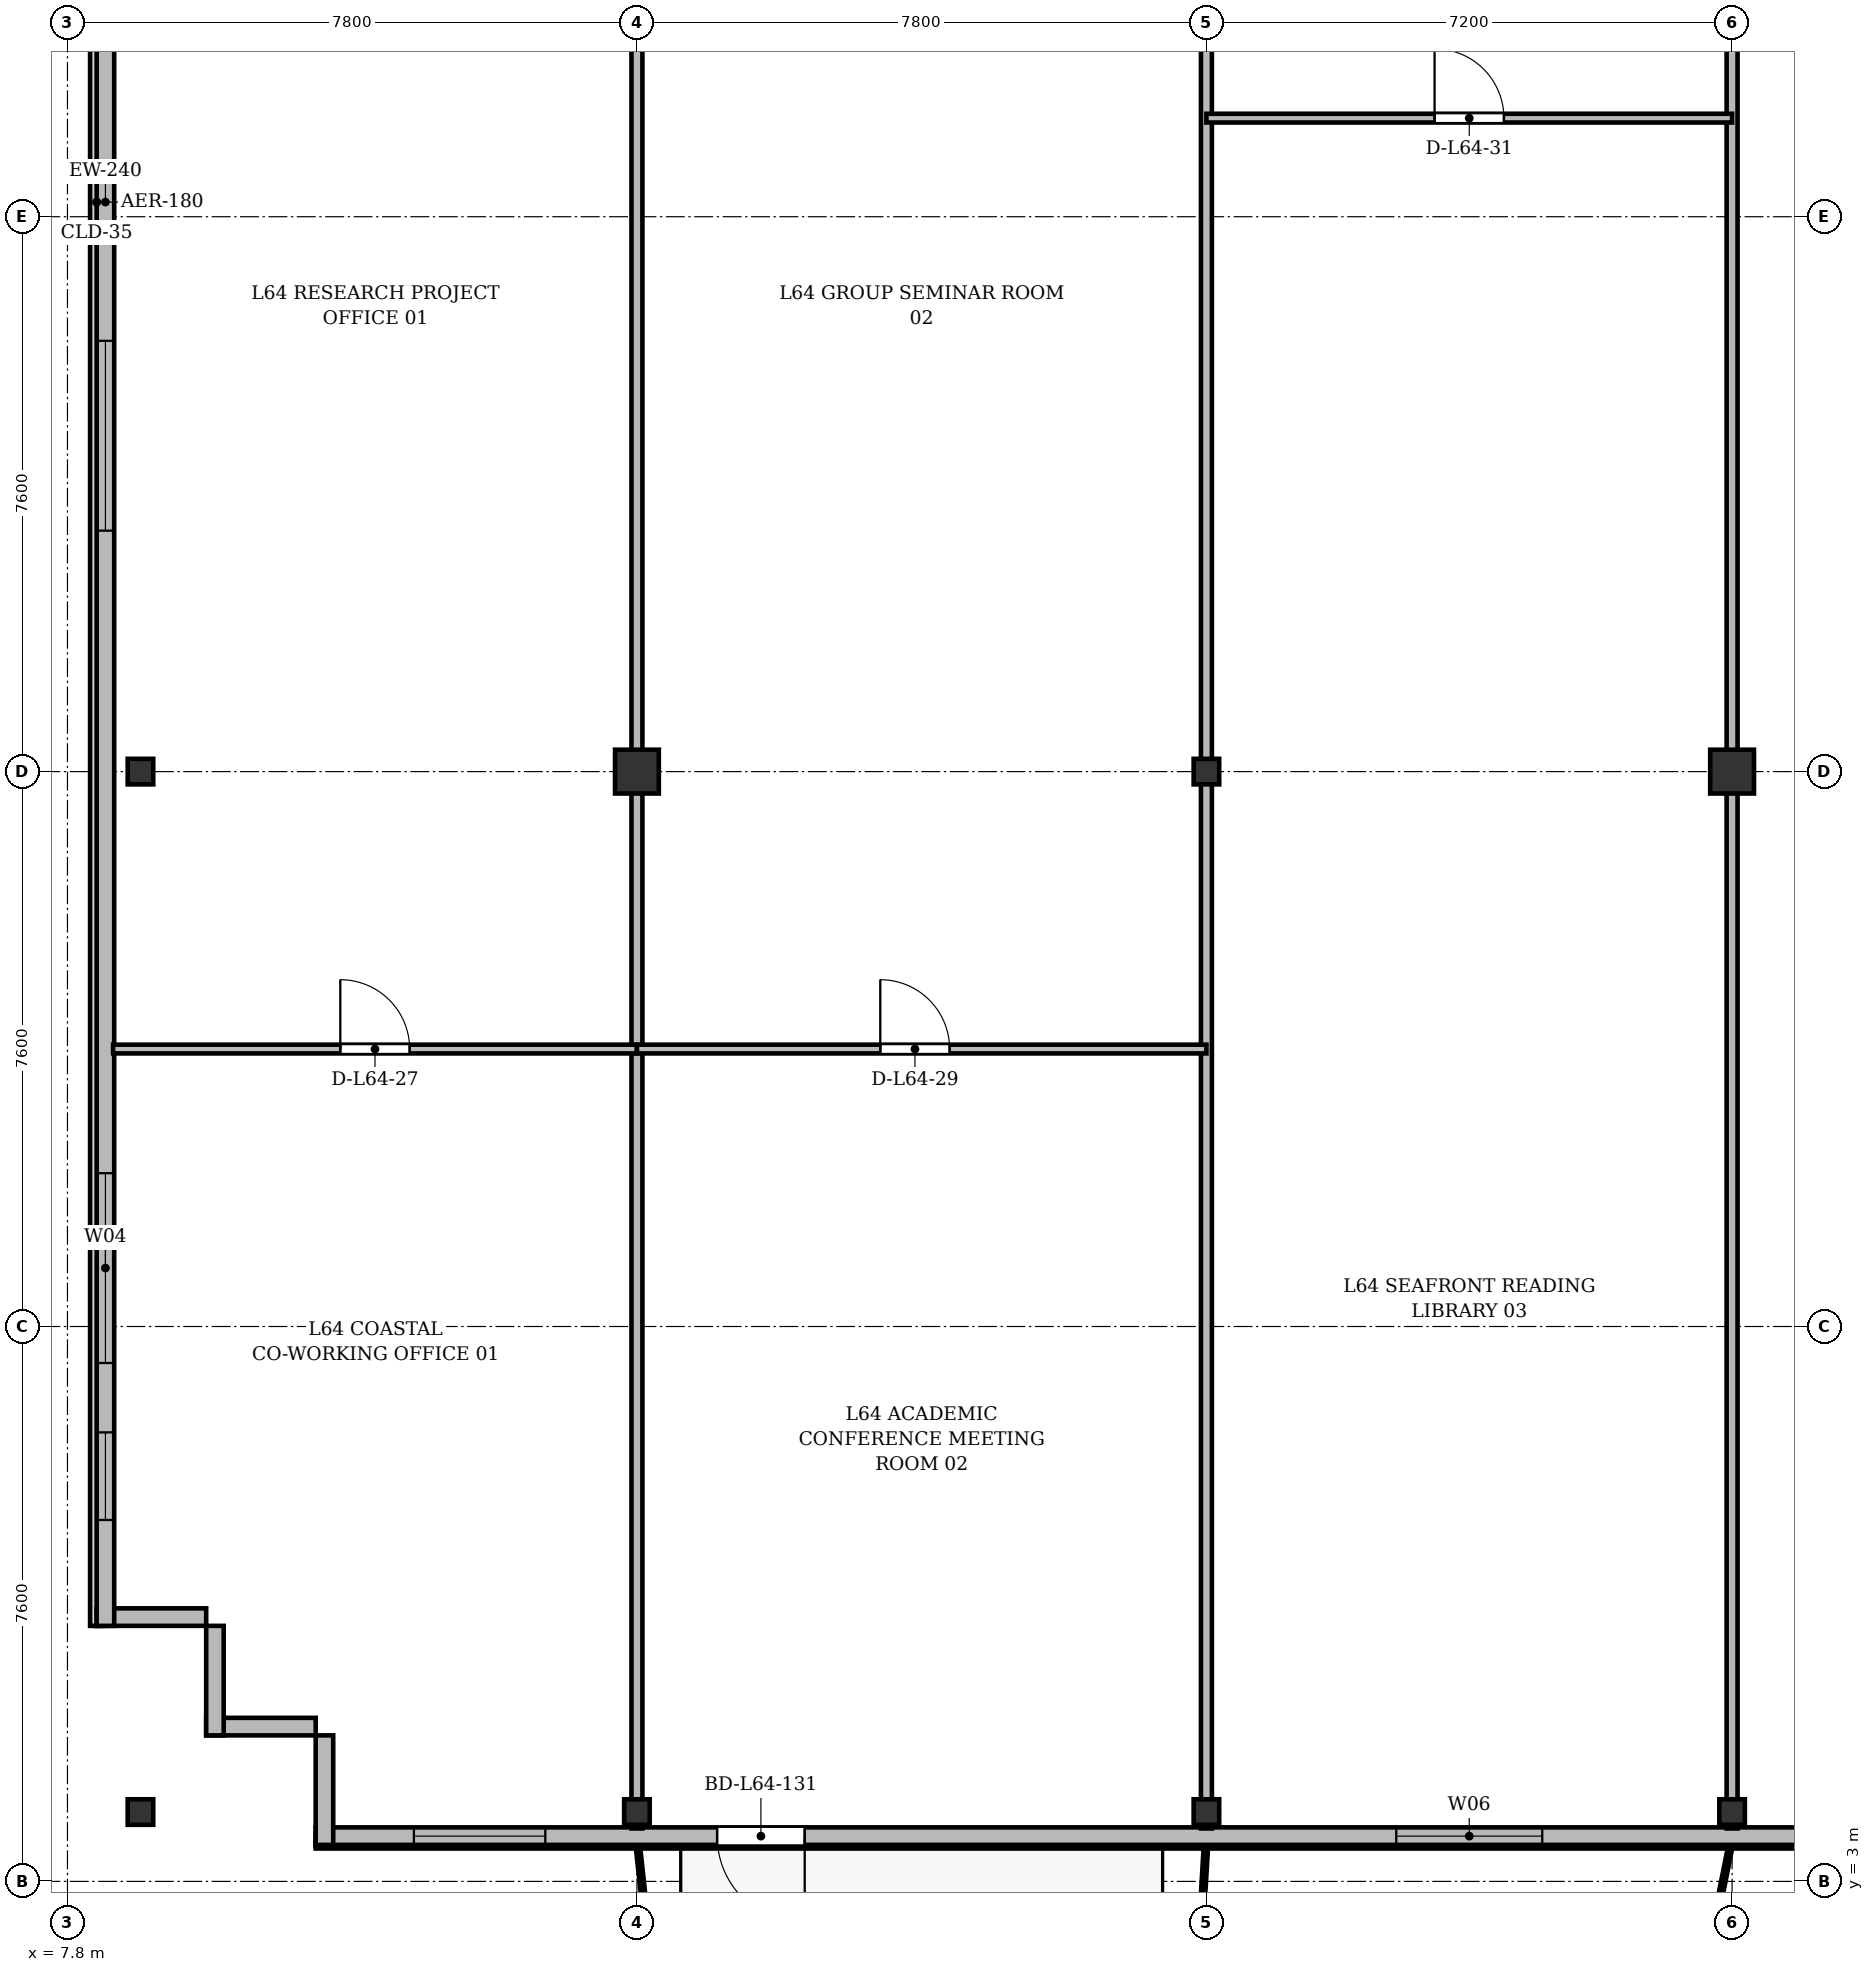
"""IFC4 building model, lengths in metres.
Left out: names, types, materials, properties, quantities, classifications, styles, units other than length and angle.
Written with IfcOpenShell. Run it as: python <this file> out.ifc"""

import sys

from ifc_helpers import new_model, si_unit, direction, frame, frame_2d, origin, origin_2d, place, context, subcontext, project, spatial, rectangle, i_section, extrude, source, transform, mapped, element, fill, save


model = new_model("IFC4")
c1 = context("Model", 3, precision=1e-05, world=origin(), true_north=direction((0.0, 1.0)))
c2 = subcontext(c1, "Body", "Model", "MODEL_VIEW")
j1 = project(units=[si_unit("LENGTHUNIT", "METRE"), si_unit("PLANEANGLEUNIT", "RADIAN")], contexts=[c1])
p1 = place(None, origin())
s1 = spatial("IfcSite", under=j1, at=p1, CompositionType="ELEMENT")
p2 = place(p1, origin())
s2 = spatial("IfcBuilding", under=s1, at=p2, CompositionType="ELEMENT")
p3 = place(p2, frame((0.0, 0.0, 248.7)))
s3 = spatial("IfcBuildingStorey", under=s2, at=p3, CompositionType="ELEMENT", Elevation=248.7)
m1 = source(origin(), c2, "Body", "SweptSolid", [
    extrude(i_section(OverallWidth=0.35, OverallDepth=0.35, WebThickness=0.018, FlangeThickness=0.028, at=origin_2d()), origin(), (0.0, 0.0, 1.0), 3.6),
])
for number, where, z_axis, x_axis in (
    (1, (8.8, 3.95, 0.0), (0.0, 0.0, 1.0), (1.0, 0.0, 0.0)),
    (2, (8.8, 18.2, 0.0), (0.0, 0.0, 1.0), (1.0, 0.0, 0.0)),
    (3, (15.6, 3.95, 0.0), (0.0, 0.0, 1.0), (1.0, 0.0, 0.0)),
):
    element("IfcColumn", number, at=place(p3, frame(where, z_axis=z_axis, x_axis=x_axis)), inside=s3, PredefinedType="COLUMN", context=c2, shape_type="MappedRepresentation", body=[
        mapped(m1, transform((0.0, 0.0, 0.0), x_axis=(1.0, 0.0, 0.0), y_axis=(0.0, 1.0, 0.0), z_axis=(0.0, 0.0, 1.0), scale=1.0)),
    ])
m2 = source(origin(), c2, "Body", "SweptSolid", [
    extrude(rectangle(XDim=0.6, YDim=0.6, at=origin_2d()), origin(), (0.0, 0.0, 1.0), 3.6),
])
p4 = place(p3, frame((15.6, 18.2, 0.0), z_axis=(0.0, 0.0, 1.0), x_axis=(1.0, 0.0, 0.0)))
e4 = element("IfcColumn", 4, at=p4, inside=s3, PredefinedType="COLUMN", context=c2, shape_type="MappedRepresentation", body=[
    mapped(m2, transform((0.0, 0.0, 0.0), x_axis=(1.0, 0.0, 0.0), y_axis=(0.0, 1.0, 0.0), z_axis=(0.0, 0.0, 1.0), scale=1.0)),
])
for number, where, z_axis, x_axis in (
    (5, (23.4, 3.95, 0.0), (0.0, 0.0, 1.0), (1.0, 0.0, 0.0)),
    (6, (23.4, 18.2, 0.0), (0.0, 0.0, 1.0), (1.0, 0.0, 0.0)),
    (7, (30.6, 3.95, 0.0), (0.0, 0.0, 1.0), (1.0, 0.0, 0.0)),
):
    element("IfcColumn", number, at=place(p3, frame(where, z_axis=z_axis, x_axis=x_axis)), inside=s3, PredefinedType="COLUMN", context=c2, shape_type="MappedRepresentation", body=[
        mapped(m1, transform((0.0, 0.0, 0.0), x_axis=(1.0, 0.0, 0.0), y_axis=(0.0, 1.0, 0.0), z_axis=(0.0, 0.0, 1.0), scale=1.0)),
    ])
p5 = place(p3, frame((30.6, 18.2, 0.0), z_axis=(0.0, 0.0, 1.0), x_axis=(1.0, 0.0, 0.0)))
e8 = element("IfcColumn", 8, at=p5, inside=s3, PredefinedType="COLUMN", context=c2, shape_type="MappedRepresentation", body=[
    mapped(m2, transform((0.0, 0.0, 0.0), x_axis=(1.0, 0.0, 0.0), y_axis=(0.0, 1.0, 0.0), z_axis=(0.0, 0.0, 1.0), scale=1.0)),
])
for number, where, z_axis, x_axis in (
    (9, (11.2, 5.12, 0.0), (0.0, 0.0, 1.0), (-1.0, 0.0, 0.0)),
    (10, (9.82, 5.0, 0.0), (0.0, 0.0, 1.0), (0.0, 1.0, 0.0)),
):
    element("IfcWall", number, at=place(p3, frame(where, z_axis=z_axis, x_axis=x_axis)), inside=s3, PredefinedType="SOLIDWALL", context=c2, shape_type="SweptSolid", body=[
        extrude(rectangle(XDim=1.5, YDim=0.24, at=frame_2d((0.75, 0.0))), origin(), (0.0, 0.0, 1.0), 3.37),
    ])
p6 = place(p3, frame((9.7, 6.62, 0.0), z_axis=(0.0, 0.0, 1.0), x_axis=(-1.0, 0.0, 0.0)))
e11 = element("IfcWall", 11, at=p6, inside=s3, PredefinedType="SOLIDWALL", context=c2, shape_type="SweptSolid", body=[
    extrude(rectangle(XDim=1.5, YDim=0.24, at=frame_2d((0.75, 0.0))), origin(), (0.0, 0.0, 1.0), 2.87),
])
p7 = place(p3, frame((8.32, 6.5, 0.0), z_axis=(0.0, 0.0, 1.0), x_axis=(0.0, 1.0, 0.0)))
e12 = element("IfcWall", 12, at=p7, inside=s3, PredefinedType="SOLIDWALL", context=c2, shape_type="SweptSolid", body=[
    extrude(rectangle(XDim=39.0, YDim=0.24, at=frame_2d((19.5, 0.0))), origin(), (0.0, 0.0, 1.0), 3.37),
])
p8 = place(p7, frame((1.45, 0.0, 0.92)))
e13 = element("IfcOpeningElement", 13, at=p8, cuts=e12, PredefinedType="OPENING", context=c2, shape_type="SweptSolid", body=[
    extrude(rectangle(XDim=1.2, YDim=1.65, at=frame_2d((0.6, 0.825))), frame((0.0, 0.13, 0.0), z_axis=(0.0, -1.0, 0.0), x_axis=(1.0, 0.0, 0.0)), (0.0, 0.0, 1.0), 0.26),
])
p9 = place(p7, frame((3.6, 0.0, 0.92)))
e14 = element("IfcOpeningElement", 14, at=p9, cuts=e12, PredefinedType="OPENING", context=c2, shape_type="SweptSolid", body=[
    extrude(rectangle(XDim=2.6, YDim=1.9, at=frame_2d((1.3, 0.95))), frame((0.0, 0.13, 0.0), z_axis=(0.0, -1.0, 0.0), x_axis=(1.0, 0.0, 0.0)), (0.0, 0.0, 1.0), 0.26),
])
p10 = place(p7, frame((15.0, 0.0, 0.92)))
e15 = element("IfcOpeningElement", 15, at=p10, cuts=e12, PredefinedType="OPENING", context=c2, shape_type="SweptSolid", body=[
    extrude(rectangle(XDim=2.6, YDim=1.9, at=frame_2d((1.3, 0.95))), frame((0.0, 0.13, 0.0), z_axis=(0.0, -1.0, 0.0), x_axis=(1.0, 0.0, 0.0)), (0.0, 0.0, 1.0), 0.26),
])
p11 = place(p7, frame((29.0, 0.0, 0.92)))
e16 = element("IfcOpeningElement", 16, at=p11, cuts=e12, PredefinedType="OPENING", context=c2, shape_type="SweptSolid", body=[
    extrude(rectangle(XDim=2.6, YDim=1.9, at=frame_2d((1.3, 0.95))), frame((0.0, 0.13, 0.0), z_axis=(0.0, -1.0, 0.0), x_axis=(1.0, 0.0, 0.0)), (0.0, 0.0, 1.0), 0.26),
])
p12 = place(p7, frame((33.3, 0.0, 0.92)))
e17 = element("IfcOpeningElement", 17, at=p12, cuts=e12, PredefinedType="OPENING", context=c2, shape_type="SweptSolid", body=[
    extrude(rectangle(XDim=1.2, YDim=1.65, at=frame_2d((0.6, 0.825))), frame((0.0, 0.13, 0.0), z_axis=(0.0, -1.0, 0.0), x_axis=(1.0, 0.0, 0.0)), (0.0, 0.0, 1.0), 0.26),
])
p13 = place(p7, frame((36.65, 0.0, 0.92)))
e18 = element("IfcOpeningElement", 18, at=p13, cuts=e12, PredefinedType="OPENING", context=c2, shape_type="SweptSolid", body=[
    extrude(rectangle(XDim=1.2, YDim=1.65, at=frame_2d((0.6, 0.825))), frame((0.0, 0.13, 0.0), z_axis=(0.0, -1.0, 0.0), x_axis=(1.0, 0.0, 0.0)), (0.0, 0.0, 1.0), 0.26),
])
p14 = place(p3, frame((63.2, 3.62, 0.0), z_axis=(0.0, 0.0, 1.0), x_axis=(-1.0, 0.0, 0.0)))
e19 = element("IfcWall", 19, at=p14, inside=s3, PredefinedType="SOLIDWALL", context=c2, shape_type="SweptSolid", body=[
    extrude(rectangle(XDim=52.0, YDim=0.24, at=frame_2d((26.0, 0.0))), origin(), (0.0, 0.0, 1.0), 3.37),
])
p15 = place(p14, frame((1.42, 0.0, 0.9)))
e20 = element("IfcOpeningElement", 20, at=p15, cuts=e19, PredefinedType="OPENING", context=c2, shape_type="SweptSolid", body=[
    extrude(rectangle(XDim=1.65, YDim=1.85, at=frame_2d((0.825, 0.925))), frame((0.0, 0.13, 0.0), z_axis=(0.0, -1.0, 0.0), x_axis=(1.0, 0.0, 0.0)), (0.0, 0.0, 1.0), 0.26),
])
p16 = place(p14, frame((7.4, 0.0, 0.9)))
e21 = element("IfcOpeningElement", 21, at=p16, cuts=e19, PredefinedType="OPENING", context=c2, shape_type="SweptSolid", body=[
    extrude(rectangle(XDim=1.8, YDim=1.8, at=frame_2d((0.9, 0.9))), frame((0.0, 0.13, 0.0), z_axis=(0.0, -1.0, 0.0), x_axis=(1.0, 0.0, 0.0)), (0.0, 0.0, 1.0), 0.26),
])
p17 = place(p14, frame((14.017, 0.0, 0.0)))
e22 = element("IfcOpeningElement", 22, at=p17, cuts=e19, PredefinedType="OPENING", context=c2, shape_type="SweptSolid", body=[
    extrude(rectangle(XDim=1.2, YDim=2.2, at=frame_2d((0.6, 1.1))), frame((0.0, 0.13, 0.0), z_axis=(0.0, -1.0, 0.0), x_axis=(1.0, 0.0, 0.0)), (0.0, 0.0, 1.0), 0.26),
])
p18 = place(p14, frame((25.25, 0.0, 0.9)))
e23 = element("IfcOpeningElement", 23, at=p18, cuts=e19, PredefinedType="OPENING", context=c2, shape_type="SweptSolid", body=[
    extrude(rectangle(XDim=1.5, YDim=1.75, at=frame_2d((0.75, 0.875))), frame((0.0, 0.13, 0.0), z_axis=(0.0, -1.0, 0.0), x_axis=(1.0, 0.0, 0.0)), (0.0, 0.0, 1.0), 0.26),
])
p19 = place(p14, frame((35.2, 0.0, 0.9)))
e24 = element("IfcOpeningElement", 24, at=p19, cuts=e19, PredefinedType="OPENING", context=c2, shape_type="SweptSolid", body=[
    extrude(rectangle(XDim=2.0, YDim=1.95, at=frame_2d((1.0, 0.975))), frame((0.0, 0.13, 0.0), z_axis=(0.0, -1.0, 0.0), x_axis=(1.0, 0.0, 0.0)), (0.0, 0.0, 1.0), 0.26),
])
p20 = place(p14, frame((45.302, 0.0, 0.0)))
e25 = element("IfcOpeningElement", 25, at=p20, cuts=e19, PredefinedType="OPENING", context=c2, shape_type="SweptSolid", body=[
    extrude(rectangle(XDim=1.2, YDim=2.2, at=frame_2d((0.6, 1.1))), frame((0.0, 0.13, 0.0), z_axis=(0.0, -1.0, 0.0), x_axis=(1.0, 0.0, 0.0)), (0.0, 0.0, 1.0), 0.26),
])
p21 = place(p14, frame((48.855, 0.0, 0.9)))
e26 = element("IfcOpeningElement", 26, at=p21, cuts=e19, PredefinedType="OPENING", context=c2, shape_type="SweptSolid", body=[
    extrude(rectangle(XDim=1.8, YDim=1.8, at=frame_2d((0.9, 0.9))), frame((0.0, 0.13, 0.0), z_axis=(0.0, -1.0, 0.0), x_axis=(1.0, 0.0, 0.0)), (0.0, 0.0, 1.0), 0.26),
])
p22 = place(p3, frame((11.32, 3.5, 0.0), z_axis=(0.0, 0.0, 1.0), x_axis=(0.0, 1.0, 0.0)))
e27 = element("IfcWall", 27, at=p22, inside=s3, PredefinedType="SOLIDWALL", context=c2, shape_type="SweptSolid", body=[
    extrude(rectangle(XDim=1.5, YDim=0.24, at=frame_2d((0.75, 0.0))), origin(), (0.0, 0.0, 1.0), 2.92),
])
for number, where, z_axis, x_axis in (
    (28, (15.6, 3.725, 0.0), (0.0, 0.0, 1.0), (0.0, 1.0, 0.0)),
    (29, (23.4, 3.725, 0.0), (0.0, 0.0, 1.0), (0.0, 1.0, 0.0)),
    (30, (30.6, 3.725, 0.0), (0.0, 0.0, 1.0), (0.0, 1.0, 0.0)),
):
    element("IfcWall", number, at=place(p3, frame(where, z_axis=z_axis, x_axis=x_axis)), inside=s3, PredefinedType="PARTITIONING", context=c2, shape_type="SweptSolid", body=[
        extrude(rectangle(XDim=27.275, YDim=0.15, at=frame_2d((13.637, 0.0))), origin(), (0.0, 0.0, 1.0), 2.87),
    ])
p23 = place(p3, frame((8.425, 14.4, 0.0), z_axis=(0.0, 0.0, 1.0), x_axis=(1.0, 0.0, 0.0)))
e31 = element("IfcWall", 31, at=p23, inside=s3, PredefinedType="PARTITIONING", context=c2, shape_type="SweptSolid", body=[
    extrude(rectangle(XDim=7.175, YDim=0.12, at=frame_2d((3.587, 0.0))), origin(), (0.0, 0.0, 1.0), 2.87),
])
p24 = place(p23, frame((3.112, 0.0, 0.0)))
e32 = element("IfcOpeningElement", 32, at=p24, cuts=e31, PredefinedType="OPENING", context=c2, shape_type="SweptSolid", body=[
    extrude(rectangle(XDim=0.95, YDim=2.15, at=frame_2d((0.475, 1.075))), frame((0.0, 0.07, 0.0), z_axis=(0.0, -1.0, 0.0), x_axis=(1.0, 0.0, 0.0)), (0.0, 0.0, 1.0), 0.14),
])
p25 = place(p3, frame((15.6, 14.4, 0.0), z_axis=(0.0, 0.0, 1.0), x_axis=(1.0, 0.0, 0.0)))
e33 = element("IfcWall", 33, at=p25, inside=s3, PredefinedType="PARTITIONING", context=c2, shape_type="SweptSolid", body=[
    extrude(rectangle(XDim=7.8, YDim=0.12, at=frame_2d((3.9, 0.0))), origin(), (0.0, 0.0, 1.0), 2.87),
])
p26 = place(p25, frame((3.333, 0.0, 0.0)))
e34 = element("IfcOpeningElement", 34, at=p26, cuts=e33, PredefinedType="OPENING", context=c2, shape_type="SweptSolid", body=[
    extrude(rectangle(XDim=0.95, YDim=2.15, at=frame_2d((0.475, 1.075))), frame((0.0, 0.07, 0.0), z_axis=(0.0, -1.0, 0.0), x_axis=(1.0, 0.0, 0.0)), (0.0, 0.0, 1.0), 0.14),
])
p27 = place(p3, frame((23.4, 27.15, 0.0), z_axis=(0.0, 0.0, 1.0), x_axis=(1.0, 0.0, 0.0)))
e35 = element("IfcWall", 35, at=p27, inside=s3, PredefinedType="PARTITIONING", context=c2, shape_type="SweptSolid", body=[
    extrude(rectangle(XDim=7.2, YDim=0.12, at=frame_2d((3.6, 0.0))), origin(), (0.0, 0.0, 1.0), 2.87),
])
p28 = place(p27, frame((3.125, 0.0, 0.0)))
e36 = element("IfcOpeningElement", 36, at=p28, cuts=e35, PredefinedType="OPENING", context=c2, shape_type="SweptSolid", body=[
    extrude(rectangle(XDim=0.95, YDim=2.15, at=frame_2d((0.475, 1.075))), frame((0.0, 0.07, 0.0), z_axis=(0.0, -1.0, 0.0), x_axis=(1.0, 0.0, 0.0)), (0.0, 0.0, 1.0), 0.14),
])
m3 = source(origin(), c2, "Body", "SweptSolid", [
    extrude(rectangle(XDim=1.2, YDim=1.65, at=frame_2d((0.6, 0.825))), frame((0.0, 0.03, 0.0), z_axis=(0.0, -1.0, 0.0), x_axis=(1.0, 0.0, 0.0)), (0.0, 0.0, 1.0), 0.06),
])
p29 = place(p8, origin())
e37 = element("IfcWindow", 37, at=p29, inside=s3, PartitioningType="SINGLE_PANEL", PredefinedType="WINDOW", context=c2, shape_type="MappedRepresentation", body=[
    mapped(m3, transform((0.0, 0.0, 0.0), x_axis=(1.0, 0.0, 0.0), y_axis=(0.0, 1.0, 0.0), z_axis=(0.0, 0.0, 1.0), scale=1.0)),
])
fill(e13, e37)
m4 = source(origin(), c2, "Body", "SweptSolid", [
    extrude(rectangle(XDim=2.6, YDim=1.9, at=frame_2d((1.3, 0.95))), frame((0.0, 0.03, 0.0), z_axis=(0.0, -1.0, 0.0), x_axis=(1.0, 0.0, 0.0)), (0.0, 0.0, 1.0), 0.06),
])
p30 = place(p9, origin())
e38 = element("IfcWindow", 38, at=p30, inside=s3, PartitioningType="SINGLE_PANEL", PredefinedType="WINDOW", context=c2, shape_type="MappedRepresentation", body=[
    mapped(m4, transform((0.0, 0.0, 0.0), x_axis=(1.0, 0.0, 0.0), y_axis=(0.0, 1.0, 0.0), z_axis=(0.0, 0.0, 1.0), scale=1.0)),
])
fill(e14, e38)
p31 = place(p10, origin())
e39 = element("IfcWindow", 39, at=p31, inside=s3, PartitioningType="SINGLE_PANEL", PredefinedType="WINDOW", context=c2, shape_type="MappedRepresentation", body=[
    mapped(m4, transform((0.0, 0.0, 0.0), x_axis=(1.0, 0.0, 0.0), y_axis=(0.0, 1.0, 0.0), z_axis=(0.0, 0.0, 1.0), scale=1.0)),
])
fill(e15, e39)
m5 = source(origin(), c2, "Body", "SweptSolid", [
    extrude(rectangle(XDim=2.0, YDim=1.95, at=frame_2d((1.0, 0.975))), frame((0.0, 0.03, 0.0), z_axis=(0.0, -1.0, 0.0), x_axis=(1.0, 0.0, 0.0)), (0.0, 0.0, 1.0), 0.06),
])
p32 = place(p19, origin())
e40 = element("IfcWindow", 40, at=p32, inside=s3, PartitioningType="SINGLE_PANEL", PredefinedType="WINDOW", context=c2, shape_type="MappedRepresentation", body=[
    mapped(m5, transform((0.0, 0.0, 0.0), x_axis=(1.0, 0.0, 0.0), y_axis=(0.0, 1.0, 0.0), z_axis=(0.0, 0.0, 1.0), scale=1.0)),
])
fill(e24, e40)
m6 = source(origin(), c2, "Body", "SweptSolid", [
    extrude(rectangle(XDim=1.2, YDim=2.2, at=frame_2d((0.6, 1.1))), frame((0.0, 0.025, 0.0), z_axis=(0.0, -1.0, 0.0), x_axis=(1.0, 0.0, 0.0)), (0.0, 0.0, 1.0), 0.05),
])
p33 = place(p20, origin())
e41 = element("IfcDoor", 41, at=p33, inside=s3, OperationType="SINGLE_SWING_LEFT", PredefinedType="DOOR", context=c2, shape_type="MappedRepresentation", body=[
    mapped(m6, transform((0.0, 0.0, 0.0), x_axis=(1.0, 0.0, 0.0), y_axis=(0.0, 1.0, 0.0), z_axis=(0.0, 0.0, 1.0), scale=1.0)),
])
fill(e25, e41)
m7 = source(origin(), c2, "Body", "SweptSolid", [
    extrude(rectangle(XDim=1.8, YDim=1.8, at=frame_2d((0.9, 0.9))), frame((0.0, 0.03, 0.0), z_axis=(0.0, -1.0, 0.0), x_axis=(1.0, 0.0, 0.0)), (0.0, 0.0, 1.0), 0.06),
])
p34 = place(p21, origin())
e42 = element("IfcWindow", 42, at=p34, inside=s3, PartitioningType="SINGLE_PANEL", PredefinedType="WINDOW", context=c2, shape_type="MappedRepresentation", body=[
    mapped(m7, transform((0.0, 0.0, 0.0), x_axis=(1.0, 0.0, 0.0), y_axis=(0.0, 1.0, 0.0), z_axis=(0.0, 0.0, 1.0), scale=1.0)),
])
fill(e26, e42)
m8 = source(origin(), c2, "Body", "SweptSolid", [
    extrude(rectangle(XDim=0.95, YDim=2.15, at=frame_2d((0.475, 1.075))), frame((0.0, 0.025, 0.0), z_axis=(0.0, -1.0, 0.0), x_axis=(1.0, 0.0, 0.0)), (0.0, 0.0, 1.0), 0.05),
])
p35 = place(p24, origin())
e43 = element("IfcDoor", 43, at=p35, inside=s3, OperationType="SINGLE_SWING_LEFT", PredefinedType="DOOR", context=c2, shape_type="MappedRepresentation", body=[
    mapped(m8, transform((0.0, 0.0, 0.0), x_axis=(1.0, 0.0, 0.0), y_axis=(0.0, 1.0, 0.0), z_axis=(0.0, 0.0, 1.0), scale=1.0)),
])
fill(e32, e43)
p36 = place(p26, origin())
e44 = element("IfcDoor", 44, at=p36, inside=s3, OperationType="SINGLE_SWING_LEFT", PredefinedType="DOOR", context=c2, shape_type="MappedRepresentation", body=[
    mapped(m8, transform((0.0, 0.0, 0.0), x_axis=(1.0, 0.0, 0.0), y_axis=(0.0, 1.0, 0.0), z_axis=(0.0, 0.0, 1.0), scale=1.0)),
])
fill(e34, e44)
p37 = place(p28, origin())
e45 = element("IfcDoor", 45, at=p37, inside=s3, OperationType="SINGLE_SWING_LEFT", PredefinedType="DOOR", context=c2, shape_type="MappedRepresentation", body=[
    mapped(m8, transform((0.0, 0.0, 0.0), x_axis=(1.0, 0.0, 0.0), y_axis=(0.0, 1.0, 0.0), z_axis=(0.0, 0.0, 1.0), scale=1.0)),
])
fill(e36, e45)
save(model, sys.argv[1])
